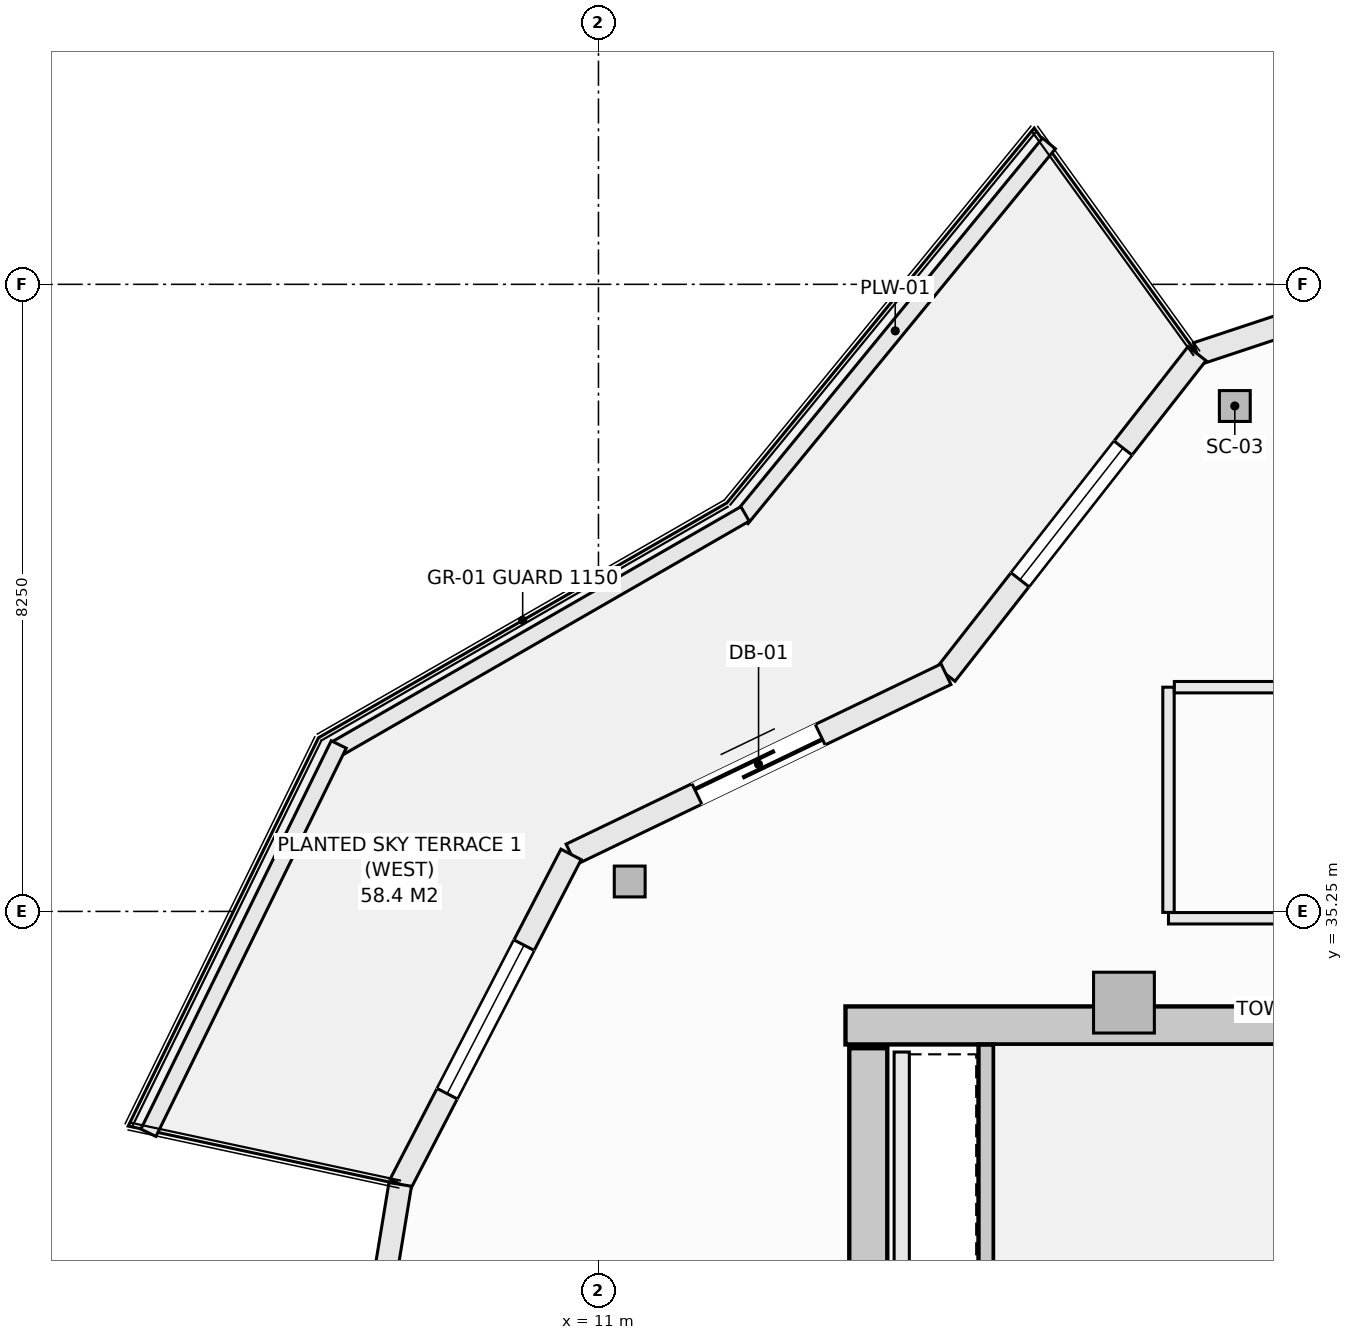
"""IFC4 building model, lengths in metres.
Left out: names, types, materials, properties, quantities, classifications, styles, units other than length and angle.
Written with IfcOpenShell. Run it as: python <this file> out.ifc"""

import sys

from ifc_helpers import new_model, si_unit, direction, frame, frame_2d, origin, origin_2d, place, context, subcontext, project, spatial, rectangle, hollow_rectangle, extrude, element, fill, save


model = new_model("IFC4")
c1 = context("Model", 3, precision=1e-05, world=origin(), true_north=direction((0.0, 1.0)))
c2 = subcontext(c1, "Body", "Model", "MODEL_VIEW")
j1 = project(units=[si_unit("LENGTHUNIT", "METRE"), si_unit("PLANEANGLEUNIT", "RADIAN")], contexts=[c1])
p1 = place(None, origin())
s1 = spatial("IfcSite", under=j1, at=p1, CompositionType="ELEMENT")
p2 = place(p1, origin())
s2 = spatial("IfcBuilding", under=s1, at=p2, CompositionType="ELEMENT")
p3 = place(p2, frame((0.0, 0.0, 239.3)))
s3 = spatial("IfcBuildingStorey", under=s2, at=p3, CompositionType="ELEMENT", Elevation=239.3)
p4 = place(p3, frame((14.25, 33.75, -0.27), z_axis=(0.0, 0.0, 1.0), x_axis=(1.0, 0.0, 0.0)))
e1 = element("IfcWall", 1, at=p4, inside=s3, PredefinedType="SHEAR", context=c2, shape_type="SweptSolid", body=[
    extrude(rectangle(XDim=13.5, YDim=0.5, at=frame_2d((6.75, 0.0))), origin(), (0.0, 0.0, 1.0), 3.3),
])
p5 = place(p3, frame((14.55, 20.55, -0.27), z_axis=(0.0, 0.0, 1.0), x_axis=(0.0, 1.0, 0.0)))
e2 = element("IfcWall", 2, at=p5, inside=s3, PredefinedType="SHEAR", context=c2, shape_type="SweptSolid", body=[
    extrude(rectangle(XDim=12.9, YDim=0.5, at=frame_2d((6.45, 0.0))), origin(), (0.0, 0.0, 1.0), 3.3),
])
for number, where, z_axis, x_axis in (
    (3, (19.372, 41.899, -0.27), (0.0, 0.0, 1.0), (1.0, 0.0, 0.0)),
    (4, (11.411, 35.644, -0.27), (0.0, 0.0, 1.0), (1.0, 0.0, 0.0)),
):
    element("IfcColumn", number, at=place(p3, frame(where, z_axis=z_axis, x_axis=x_axis)), inside=s3, PredefinedType="COLUMN", context=c2, shape_type="SweptSolid", body=[
        extrude(hollow_rectangle(XDim=0.406, YDim=0.406, WallThickness=0.016, at=origin_2d()), origin(), (0.0, 0.0, 1.0), 3.3),
    ])
p6 = place(p3, frame((17.914, 34.05, -0.27), z_axis=(0.0, 0.0, 1.0), x_axis=(1.0, 0.0, 0.0)))
e5 = element("IfcColumn", 5, at=p6, inside=s3, PredefinedType="PILASTER", context=c2, shape_type="SweptSolid", body=[
    extrude(rectangle(XDim=0.8, YDim=0.8, at=origin_2d()), origin(), (0.0, 0.0, 1.0), 3.3),
])
p7 = place(p3, frame((18.875, 42.588, 0.0), z_axis=(0.0, 0.0, 1.0), x_axis=(0.949232769585, 0.314574552605, 0.0)))
e6 = element("IfcWall", 6, at=p7, inside=s3, PredefinedType="SOLIDWALL", context=c2, shape_type="SweptSolid", body=[
    extrude(rectangle(XDim=5.717, YDim=0.3, at=frame_2d((2.858, 0.0))), origin(), (0.0, 0.0, 1.0), 2.605),
])
p8 = place(p7, frame((2.65, 0.0, 0.72)))
e7 = element("IfcOpeningElement", 7, at=p8, cuts=e6, PredefinedType="OPENING", context=c2, shape_type="SweptSolid", body=[
    extrude(rectangle(XDim=2.2, YDim=1.65, at=frame_2d((1.1, 0.825))), frame((0.0, 0.16, 0.0), z_axis=(0.0, -1.0, 0.0), x_axis=(1.0, 0.0, 0.0)), (0.0, 0.0, 1.0), 0.32),
])
p9 = place(p3, frame((15.573, 38.37, 0.0), z_axis=(0.0, 0.0, 1.0), x_axis=(0.61644588519, 0.787397276241, 0.0)))
e8 = element("IfcWall", 8, at=p9, inside=s3, PredefinedType="SOLIDWALL", context=c2, shape_type="SweptSolid", body=[
    extrude(rectangle(XDim=5.357, YDim=0.3, at=frame_2d((2.678, 0.0))), origin(), (0.0, 0.0, 1.0), 2.605),
])
p10 = place(p9, frame((1.579, 0.0, 0.72)))
e9 = element("IfcOpeningElement", 9, at=p10, cuts=e8, PredefinedType="OPENING", context=c2, shape_type="SweptSolid", body=[
    extrude(rectangle(XDim=2.2, YDim=1.65, at=frame_2d((1.1, 0.825))), frame((0.0, 0.16, 0.0), z_axis=(0.0, -1.0, 0.0), x_axis=(1.0, 0.0, 0.0)), (0.0, 0.0, 1.0), 0.32),
])
p11 = place(p3, frame((10.639, 36.0, 0.0), z_axis=(0.0, 0.0, 1.0), x_axis=(0.901355238351, 0.433080517106, 0.0)))
e10 = element("IfcWall", 10, at=p11, inside=s3, PredefinedType="SOLIDWALL", context=c2, shape_type="SweptSolid", body=[
    extrude(rectangle(XDim=5.473, YDim=0.3, at=frame_2d((2.737, 0.0))), origin(), (0.0, 0.0, 1.0), 2.605),
])
p12 = place(p11, frame((1.837, 0.0, 0.0)))
e11 = element("IfcOpeningElement", 11, at=p12, cuts=e10, PredefinedType="OPENING", context=c2, shape_type="SweptSolid", body=[
    extrude(rectangle(XDim=1.8, YDim=2.25, at=frame_2d((0.9, 1.125))), frame((0.0, 0.16, 0.0), z_axis=(0.0, -1.0, 0.0), x_axis=(1.0, 0.0, 0.0)), (0.0, 0.0, 1.0), 0.32),
])
p13 = place(p3, frame((8.392, 31.659, 0.0), z_axis=(0.0, 0.0, 1.0), x_axis=(0.459793771602, 0.888025724625, 0.0)))
e12 = element("IfcWall", 12, at=p13, inside=s3, PredefinedType="SOLIDWALL", context=c2, shape_type="SweptSolid", body=[
    extrude(rectangle(XDim=4.889, YDim=0.3, at=frame_2d((2.444, 0.0))), origin(), (0.0, 0.0, 1.0), 2.605),
])
p14 = place(p13, frame((1.344, 0.0, 0.72)))
e13 = element("IfcOpeningElement", 13, at=p14, cuts=e12, PredefinedType="OPENING", context=c2, shape_type="SweptSolid", body=[
    extrude(rectangle(XDim=2.2, YDim=1.65, at=frame_2d((1.1, 0.825))), frame((0.0, 0.16, 0.0), z_axis=(0.0, -1.0, 0.0), x_axis=(1.0, 0.0, 0.0)), (0.0, 0.0, 1.0), 0.32),
])
p15 = place(p3, frame((7.625, 27.0, 0.0), z_axis=(0.0, 0.0, 1.0), x_axis=(0.162369371657, 0.986730047758, 0.0)))
e14 = element("IfcWall", 14, at=p15, inside=s3, PredefinedType="SOLIDWALL", context=c2, shape_type="SweptSolid", body=[
    extrude(rectangle(XDim=4.721, YDim=0.3, at=frame_2d((2.361, 0.0))), origin(), (0.0, 0.0, 1.0), 2.605),
])
p16 = place(p15, frame((1.261, 0.0, 0.72)))
e15 = element("IfcOpeningElement", 15, at=p16, cuts=e14, PredefinedType="OPENING", context=c2, shape_type="SweptSolid", body=[
    extrude(rectangle(XDim=2.2, YDim=1.65, at=frame_2d((1.1, 0.825))), frame((0.0, 0.16, 0.0), z_axis=(0.0, -1.0, 0.0), x_axis=(1.0, 0.0, 0.0)), (0.0, 0.0, 1.0), 0.32),
])
p17 = place(p3, frame((12.882, 40.421, 0.0), z_axis=(0.0, 0.0, 1.0), x_axis=(0.63407318032, 0.77327304492, 0.0)))
e16 = element("IfcWall", 16, at=p17, inside=s3, PredefinedType="PARAPET", context=c2, shape_type="SweptSolid", body=[
    extrude(rectangle(XDim=6.379, YDim=0.22, at=frame_2d((3.189, 0.0))), origin(), (0.0, 0.0, 1.0), 0.52),
])
p18 = place(p3, frame((7.557, 37.391, 0.0), z_axis=(0.0, 0.0, 1.0), x_axis=(0.866901621005, 0.49847926687, 0.0)))
e17 = element("IfcWall", 17, at=p18, inside=s3, PredefinedType="PARAPET", context=c2, shape_type="SweptSolid", body=[
    extrude(rectangle(XDim=6.197, YDim=0.22, at=frame_2d((3.098, 0.0))), origin(), (0.0, 0.0, 1.0), 0.52),
])
p19 = place(p3, frame((5.079, 32.338, 0.0), z_axis=(0.0, 0.0, 1.0), x_axis=(0.440058847499, 0.897968936399, 0.0)))
e18 = element("IfcWall", 18, at=p19, inside=s3, PredefinedType="PARAPET", context=c2, shape_type="SweptSolid", body=[
    extrude(rectangle(XDim=5.689, YDim=0.22, at=frame_2d((2.845, 0.0))), origin(), (0.0, 0.0, 1.0), 0.52),
])
p20 = place(p3, frame((16.1, 30.462, -0.27), z_axis=(0.0, 0.0, 1.0), x_axis=(0.0, 1.0, 0.0)))
e19 = element("IfcWall", 19, at=p20, inside=s3, PredefinedType="SHEAR", context=c2, shape_type="SweptSolid", body=[
    extrude(rectangle(XDim=3.036, YDim=0.2, at=frame_2d((1.518, 0.0))), origin(), (0.0, 0.0, 1.0), 3.3),
])
p21 = place(p3, frame((14.99, 30.55, 0.0), z_axis=(0.0, 0.0, 1.0), x_axis=(0.0, 1.0, 0.0)))
e20 = element("IfcWall", 20, at=p21, inside=s3, PredefinedType="SOLIDWALL", context=c2, shape_type="SweptSolid", body=[
    extrude(rectangle(XDim=2.85, YDim=0.2, at=frame_2d((1.425, 0.0))), origin(), (0.0, 0.0, 1.0), 3.03),
])
p22 = place(p3, frame((18.5, 35.16, 0.0), z_axis=(0.0, 0.0, 1.0), x_axis=(1.0, 0.0, 0.0)))
e21 = element("IfcWall", 21, at=p22, inside=s3, PredefinedType="PARTITIONING", context=c2, shape_type="SweptSolid", body=[
    extrude(rectangle(XDim=8.573, YDim=0.15, at=frame_2d((4.287, 0.0))), origin(), (0.0, 0.0, 1.0), 3.03),
])
p23 = place(p3, frame((18.5, 35.237, 0.0), z_axis=(0.0, 0.0, 1.0), x_axis=(0.0, 1.0, 0.0)))
e22 = element("IfcWall", 22, at=p23, inside=s3, PredefinedType="PARTITIONING", context=c2, shape_type="SweptSolid", body=[
    extrude(rectangle(XDim=2.963, YDim=0.15, at=frame_2d((1.481, 0.0))), origin(), (0.0, 0.0, 1.0), 3.03),
])
p24 = place(p3, frame((18.577, 38.2, 0.0), z_axis=(0.0, 0.0, 1.0), x_axis=(1.0, 0.0, 0.0)))
e23 = element("IfcWall", 23, at=p24, inside=s3, PredefinedType="PARTITIONING", context=c2, shape_type="SweptSolid", body=[
    extrude(rectangle(XDim=8.496, YDim=0.15, at=frame_2d((4.248, 0.0))), origin(), (0.0, 0.0, 1.0), 3.03),
])
p25 = place(p10, origin())
e24 = element("IfcWindow", 24, at=p25, inside=s3, PartitioningType="SINGLE_PANEL", PredefinedType="WINDOW", context=c2, shape_type="SweptSolid", body=[
    extrude(rectangle(XDim=2.2, YDim=1.65, at=frame_2d((1.1, 0.825))), frame((0.0, 0.03, 0.0), z_axis=(0.0, -1.0, 0.0), x_axis=(1.0, 0.0, 0.0)), (0.0, 0.0, 1.0), 0.06),
])
fill(e9, e24)
p26 = place(p12, origin())
e25 = element("IfcDoor", 25, at=p26, inside=s3, OperationType="SLIDING_TO_LEFT", PredefinedType="DOOR", context=c2, shape_type="SweptSolid", body=[
    extrude(rectangle(XDim=1.8, YDim=2.25, at=frame_2d((0.9, 1.125))), frame((0.0, 0.025, 0.0), z_axis=(0.0, -1.0, 0.0), x_axis=(1.0, 0.0, 0.0)), (0.0, 0.0, 1.0), 0.05),
])
fill(e11, e25)
p27 = place(p14, origin())
e26 = element("IfcWindow", 26, at=p27, inside=s3, PartitioningType="SINGLE_PANEL", PredefinedType="WINDOW", context=c2, shape_type="SweptSolid", body=[
    extrude(rectangle(XDim=2.2, YDim=1.65, at=frame_2d((1.1, 0.825))), frame((0.0, 0.03, 0.0), z_axis=(0.0, -1.0, 0.0), x_axis=(1.0, 0.0, 0.0)), (0.0, 0.0, 1.0), 0.06),
])
fill(e13, e26)
save(model, sys.argv[1])
